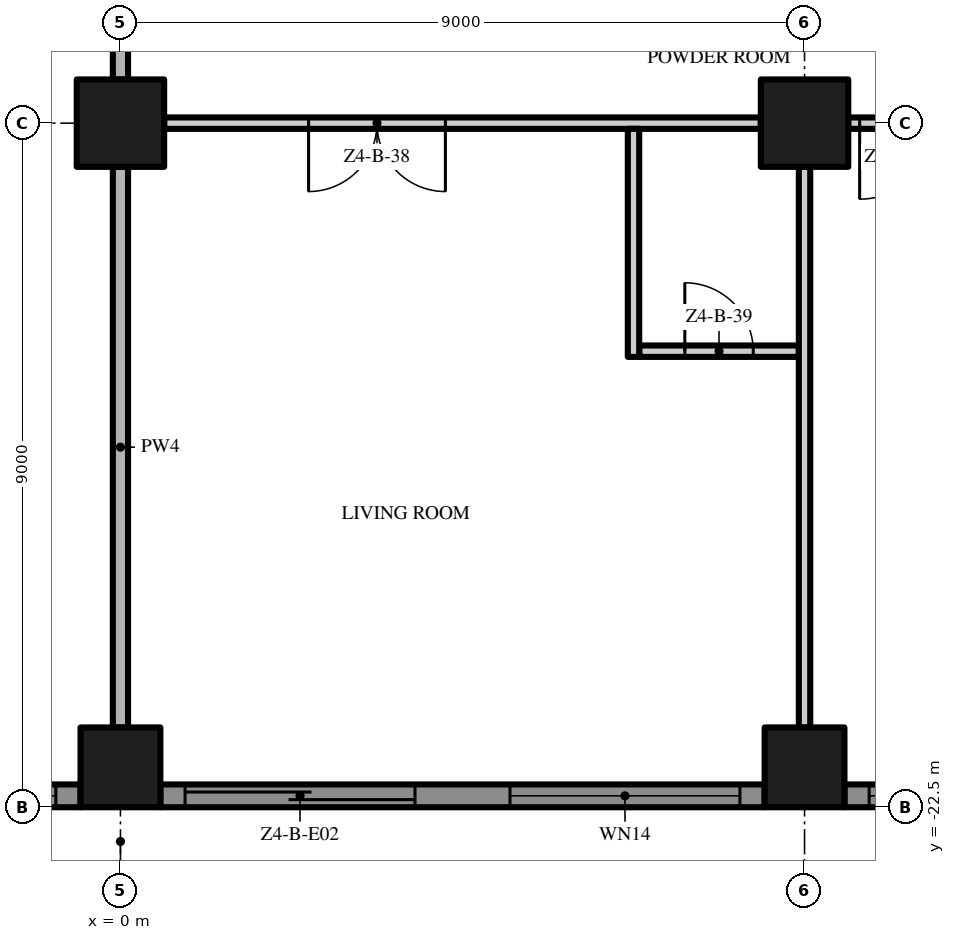
"""IFC4 building model, lengths in metres.
Left out: names, types, materials, properties, quantities, classifications, styles, units other than length and angle.
Written with IfcOpenShell. Run it as: python <this file> out.ifc"""

import sys

from ifc_helpers import new_model, si_unit, direction, frame, frame_2d, origin, origin_2d, place, context, subcontext, project, spatial, polyline, rectangle, outline, extrude, element, fill, save


model = new_model("IFC4")
c1 = context("Model", 3, precision=1e-05, world=origin(), true_north=direction((0.0, 1.0)))
c2 = subcontext(c1, "Body", "Model", "MODEL_VIEW")
j1 = project(units=[si_unit("LENGTHUNIT", "METRE"), si_unit("PLANEANGLEUNIT", "RADIAN")], contexts=[c1])
p1 = place(None, origin())
s1 = spatial("IfcSite", under=j1, at=p1, CompositionType="ELEMENT")
p2 = place(p1, origin())
s2 = spatial("IfcBuilding", under=s1, at=p2, CompositionType="ELEMENT")
p3 = place(p2, frame((0.0, 0.0, 195.8)))
s3 = spatial("IfcBuildingStorey", under=s2, at=p3, CompositionType="ELEMENT", Elevation=195.8)
p4 = place(p3, frame((0.0, -13.5, 0.0), z_axis=(0.0, 0.0, 1.0), x_axis=(1.0, 0.0, 0.0)))
e1 = element("IfcColumn", 1, at=p4, inside=s3, PredefinedType="COLUMN", context=c2, shape_type="SweptSolid", body=[
    extrude(rectangle(XDim=1.15, YDim=1.15, at=origin_2d()), origin(), (0.0, 0.0, 1.0), 3.5),
])
p5 = place(p3, frame((0.0, -21.975, 0.0), z_axis=(0.0, 0.0, 1.0), x_axis=(1.0, 0.0, 0.0)))
e2 = element("IfcColumn", 2, at=p5, inside=s3, PredefinedType="COLUMN", context=c2, shape_type="SweptSolid", body=[
    extrude(rectangle(XDim=1.05, YDim=1.05, at=origin_2d()), origin(), (0.0, 0.0, 1.0), 3.5),
])
p6 = place(p3, frame((9.0, -13.5, 0.0), z_axis=(0.0, 0.0, 1.0), x_axis=(1.0, 0.0, 0.0)))
e3 = element("IfcColumn", 3, at=p6, inside=s3, PredefinedType="COLUMN", context=c2, shape_type="SweptSolid", body=[
    extrude(rectangle(XDim=1.15, YDim=1.15, at=origin_2d()), origin(), (0.0, 0.0, 1.0), 3.5),
])
p7 = place(p3, frame((9.0, -21.975, 0.0), z_axis=(0.0, 0.0, 1.0), x_axis=(1.0, 0.0, 0.0)))
e4 = element("IfcColumn", 4, at=p7, inside=s3, PredefinedType="COLUMN", context=c2, shape_type="SweptSolid", body=[
    extrude(rectangle(XDim=1.05, YDim=1.05, at=origin_2d()), origin(), (0.0, 0.0, 1.0), 3.5),
])
p8 = place(p3, frame((-0.525, -22.35, 0.0), z_axis=(0.0, 0.0, 1.0), x_axis=(-1.0, 0.0, 0.0)))
e5 = element("IfcWall", 5, at=p8, inside=s3, PredefinedType="SOLIDWALL", context=c2, shape_type="SweptSolid", body=[
    extrude(rectangle(XDim=7.95, YDim=0.3, at=frame_2d((3.975, 0.0))), origin(), (0.0, 0.0, 1.0), 3.5),
])
p9 = place(p8, frame((4.6, 0.0, 0.45)))
e6 = element("IfcOpeningElement", 6, at=p9, cuts=e5, PredefinedType="OPENING", context=c2, shape_type="SweptSolid", body=[
    extrude(rectangle(XDim=3.025, YDim=2.65, at=frame_2d((1.512, 1.325))), frame((0.0, 0.16, 0.0), z_axis=(0.0, -1.0, 0.0), x_axis=(1.0, 0.0, 0.0)), (0.0, 0.0, 1.0), 0.32),
])
p10 = place(p8, frame((0.325, 0.0, 0.45)))
e7 = element("IfcOpeningElement", 7, at=p10, cuts=e5, PredefinedType="OPENING", context=c2, shape_type="SweptSolid", body=[
    extrude(rectangle(XDim=3.025, YDim=2.65, at=frame_2d((1.512, 1.325))), frame((0.0, 0.16, 0.0), z_axis=(0.0, -1.0, 0.0), x_axis=(1.0, 0.0, 0.0)), (0.0, 0.0, 1.0), 0.32),
])
p11 = place(p3, frame((8.475, -22.35, 0.0), z_axis=(0.0, 0.0, 1.0), x_axis=(-1.0, 0.0, 0.0)))
e8 = element("IfcWall", 8, at=p11, inside=s3, PredefinedType="SOLIDWALL", context=c2, shape_type="SweptSolid", body=[
    extrude(rectangle(XDim=7.95, YDim=0.3, at=frame_2d((3.975, 0.0))), origin(), (0.0, 0.0, 1.0), 3.5),
])
p12 = place(p11, frame((4.6, 0.0, 0.0)))
e9 = element("IfcOpeningElement", 9, at=p12, cuts=e8, PredefinedType="OPENING", context=c2, shape_type="SweptSolid", body=[
    extrude(rectangle(XDim=3.025, YDim=2.4, at=frame_2d((1.512, 1.2))), frame((0.0, 0.16, 0.0), z_axis=(0.0, -1.0, 0.0), x_axis=(1.0, 0.0, 0.0)), (0.0, 0.0, 1.0), 0.32),
])
p13 = place(p11, frame((0.325, 0.0, 0.45)))
e10 = element("IfcOpeningElement", 10, at=p13, cuts=e8, PredefinedType="OPENING", context=c2, shape_type="SweptSolid", body=[
    extrude(rectangle(XDim=3.025, YDim=2.65, at=frame_2d((1.512, 1.325))), frame((0.0, 0.16, 0.0), z_axis=(0.0, -1.0, 0.0), x_axis=(1.0, 0.0, 0.0)), (0.0, 0.0, 1.0), 0.32),
])
p14 = place(p3, frame((17.475, -22.35, 0.0), z_axis=(0.0, 0.0, 1.0), x_axis=(-1.0, 0.0, 0.0)))
e11 = element("IfcWall", 11, at=p14, inside=s3, PredefinedType="SOLIDWALL", context=c2, shape_type="SweptSolid", body=[
    extrude(rectangle(XDim=7.95, YDim=0.3, at=frame_2d((3.975, 0.0))), origin(), (0.0, 0.0, 1.0), 3.5),
])
p15 = place(p14, frame((4.6, 0.0, 0.45)))
e12 = element("IfcOpeningElement", 12, at=p15, cuts=e11, PredefinedType="OPENING", context=c2, shape_type="SweptSolid", body=[
    extrude(rectangle(XDim=3.025, YDim=2.65, at=frame_2d((1.512, 1.325))), frame((0.0, 0.16, 0.0), z_axis=(0.0, -1.0, 0.0), x_axis=(1.0, 0.0, 0.0)), (0.0, 0.0, 1.0), 0.32),
])
p16 = place(p14, frame((0.325, 0.0, 0.45)))
e13 = element("IfcOpeningElement", 13, at=p16, cuts=e11, PredefinedType="OPENING", context=c2, shape_type="SweptSolid", body=[
    extrude(rectangle(XDim=3.025, YDim=2.65, at=frame_2d((1.512, 1.325))), frame((0.0, 0.16, 0.0), z_axis=(0.0, -1.0, 0.0), x_axis=(1.0, 0.0, 0.0)), (0.0, 0.0, 1.0), 0.32),
])
p17 = place(p3, origin())
e14 = element("IfcWall", 14, at=p17, inside=s3, PredefinedType="USERDEFINED", context=c2, shape_type="SweptSolid", body=[
    extrude(outline(polyline([(-22.5, -24.3), (-21.0, -23.595), (-19.5, -23.159), (-18.75, -23.1), (-18.0, -23.159), (-16.5, -23.595), (-15.0, -24.3), (-13.5, -25.005), (-12.0, -25.441), (-11.25, -25.5), (-10.5, -25.441), (-9.0, -25.005), (-7.5, -24.3), (-6.0, -23.595), (-4.5, -23.159), (-3.75, -23.1), (-3.0, -23.159), (-1.5, -23.595), (0.0, -24.3), (1.5, -25.005), (3.0, -25.441), (3.75, -25.5), (4.5, -25.441), (6.0, -25.005), (7.5, -24.3), (9.0, -23.595), (10.5, -23.159), (11.25, -23.1), (12.0, -23.159), (13.5, -23.595), (15.0, -24.3), (16.5, -25.005), (18.0, -25.441), (18.75, -25.5), (19.5, -25.441), (21.0, -25.005), (22.5, -24.3), (22.394, -24.074), (20.911, -24.771), (19.455, -25.194), (18.75, -25.249), (18.045, -25.194), (16.589, -24.771), (15.106, -24.074), (13.589, -23.36), (12.045, -22.911), (11.25, -22.849), (10.455, -22.911), (8.911, -23.36), (7.394, -24.074), (5.911, -24.771), (4.455, -25.194), (3.75, -25.249), (3.045, -25.194), (1.589, -24.771), (0.106, -24.074), (-1.411, -23.36), (-2.955, -22.911), (-3.75, -22.849), (-4.545, -22.911), (-6.089, -23.36), (-7.606, -24.074), (-9.089, -24.771), (-10.545, -25.194), (-11.25, -25.249), (-11.955, -25.194), (-13.411, -24.771), (-14.894, -24.074), (-16.411, -23.36), (-17.955, -22.911), (-18.75, -22.849), (-19.545, -22.911), (-21.089, -23.36), (-22.606, -24.074), (-22.5, -24.3)])), origin(), (0.0, 0.0, 1.0), 0.9),
])
p18 = place(p3, frame((6.825, -16.5, 0.0), z_axis=(0.0, 0.0, 1.0), x_axis=(1.0, 0.0, 0.0)))
e15 = element("IfcWall", 15, at=p18, inside=s3, PredefinedType="PARTITIONING", context=c2, shape_type="SweptSolid", body=[
    extrude(rectangle(XDim=2.1, YDim=0.15, at=frame_2d((1.05, 0.0))), origin(), (0.0, 0.0, 1.0), 3.5),
])
p19 = place(p18, frame((0.6, 0.0, 0.0)))
e16 = element("IfcOpeningElement", 16, at=p19, cuts=e15, PredefinedType="OPENING", context=c2, shape_type="SweptSolid", body=[
    extrude(rectangle(XDim=0.9, YDim=2.1, at=frame_2d((0.45, 1.05))), frame((0.0, 0.085, 0.0), z_axis=(0.0, -1.0, 0.0), x_axis=(1.0, 0.0, 0.0)), (0.0, 0.0, 1.0), 0.17),
])
p20 = place(p3, frame((8.425, -13.5, 0.0), z_axis=(0.0, 0.0, 1.0), x_axis=(-1.0, 0.0, 0.0)))
e17 = element("IfcWall", 17, at=p20, inside=s3, PredefinedType="PARTITIONING", context=c2, shape_type="SweptSolid", body=[
    extrude(rectangle(XDim=7.85, YDim=0.15, at=frame_2d((3.925, 0.0))), origin(), (0.0, 0.0, 1.0), 3.5),
])
p21 = place(p20, frame((4.15, 0.0, 0.0)))
e18 = element("IfcOpeningElement", 18, at=p21, cuts=e17, PredefinedType="OPENING", context=c2, shape_type="SweptSolid", body=[
    extrude(rectangle(XDim=1.8, YDim=2.4, at=frame_2d((0.9, 1.2))), frame((0.0, 0.085, 0.0), z_axis=(0.0, -1.0, 0.0), x_axis=(1.0, 0.0, 0.0)), (0.0, 0.0, 1.0), 0.17),
])
p22 = place(p3, frame((17.425, -13.5, 0.0), z_axis=(0.0, 0.0, 1.0), x_axis=(-1.0, 0.0, 0.0)))
e19 = element("IfcWall", 19, at=p22, inside=s3, PredefinedType="PARTITIONING", context=c2, shape_type="SweptSolid", body=[
    extrude(rectangle(XDim=7.85, YDim=0.15, at=frame_2d((3.925, 0.0))), origin(), (0.0, 0.0, 1.0), 3.5),
])
p23 = place(p22, frame((6.7, 0.0, 0.0)))
e20 = element("IfcOpeningElement", 20, at=p23, cuts=e19, PredefinedType="OPENING", context=c2, shape_type="SweptSolid", body=[
    extrude(rectangle(XDim=1.0, YDim=2.4, at=frame_2d((0.5, 1.2))), frame((0.0, 0.085, 0.0), z_axis=(0.0, -1.0, 0.0), x_axis=(1.0, 0.0, 0.0)), (0.0, 0.0, 1.0), 0.17),
])
p24 = place(p22, frame((0.15, 0.0, 0.0)))
e21 = element("IfcOpeningElement", 21, at=p24, cuts=e19, PredefinedType="OPENING", context=c2, shape_type="SweptSolid", body=[
    extrude(rectangle(XDim=1.0, YDim=2.4, at=frame_2d((0.5, 1.2))), frame((0.0, 0.085, 0.0), z_axis=(0.0, -1.0, 0.0), x_axis=(1.0, 0.0, 0.0)), (0.0, 0.0, 1.0), 0.17),
])
p25 = place(p3, frame((0.0, -21.45, 0.0), z_axis=(0.0, 0.0, 1.0), x_axis=(0.0, 1.0, 0.0)))
e22 = element("IfcWall", 22, at=p25, inside=s3, PredefinedType="PARTITIONING", context=c2, shape_type="SweptSolid", body=[
    extrude(rectangle(XDim=7.375, YDim=0.2, at=frame_2d((3.688, 0.0))), origin(), (0.0, 0.0, 1.0), 3.5),
])
p26 = place(p3, frame((0.0, -12.925, 0.0), z_axis=(0.0, 0.0, 1.0), x_axis=(0.0, 1.0, 0.0)))
e23 = element("IfcWall", 23, at=p26, inside=s3, PredefinedType="PARTITIONING", context=c2, shape_type="SweptSolid", body=[
    extrude(rectangle(XDim=7.85, YDim=0.2, at=frame_2d((3.925, 0.0))), origin(), (0.0, 0.0, 1.0), 3.5),
])
p27 = place(p3, frame((6.75, -16.575, 0.0), z_axis=(0.0, 0.0, 1.0), x_axis=(0.0, 1.0, 0.0)))
e24 = element("IfcWall", 24, at=p27, inside=s3, PredefinedType="PARTITIONING", context=c2, shape_type="SweptSolid", body=[
    extrude(rectangle(XDim=3.0, YDim=0.15, at=frame_2d((1.5, 0.0))), origin(), (0.0, 0.0, 1.0), 3.5),
])
p28 = place(p3, frame((9.0, -21.45, 0.0), z_axis=(0.0, 0.0, 1.0), x_axis=(0.0, 1.0, 0.0)))
e25 = element("IfcWall", 25, at=p28, inside=s3, PredefinedType="PARTITIONING", context=c2, shape_type="SweptSolid", body=[
    extrude(rectangle(XDim=7.375, YDim=0.15, at=frame_2d((3.688, 0.0))), origin(), (0.0, 0.0, 1.0), 3.5),
])
p29 = place(p10, origin())
e26 = element("IfcWindow", 26, at=p29, inside=s3, PartitioningType="SINGLE_PANEL", PredefinedType="WINDOW", context=c2, shape_type="SweptSolid", body=[
    extrude(rectangle(XDim=3.025, YDim=2.65, at=frame_2d((1.512, 1.325))), frame((0.0, 0.03, 0.0), z_axis=(0.0, -1.0, 0.0), x_axis=(1.0, 0.0, 0.0)), (0.0, 0.0, 1.0), 0.06),
])
fill(e7, e26)
p30 = place(p12, origin())
e27 = element("IfcDoor", 27, at=p30, inside=s3, OperationType="SINGLE_SWING_LEFT", PredefinedType="DOOR", context=c2, shape_type="SweptSolid", body=[
    extrude(rectangle(XDim=3.025, YDim=2.4, at=frame_2d((1.512, 1.2))), frame((0.0, 0.025, 0.0), z_axis=(0.0, -1.0, 0.0), x_axis=(1.0, 0.0, 0.0)), (0.0, 0.0, 1.0), 0.05),
])
fill(e9, e27)
p31 = place(p13, origin())
e28 = element("IfcWindow", 28, at=p31, inside=s3, PartitioningType="SINGLE_PANEL", PredefinedType="WINDOW", context=c2, shape_type="SweptSolid", body=[
    extrude(rectangle(XDim=3.025, YDim=2.65, at=frame_2d((1.512, 1.325))), frame((0.0, 0.03, 0.0), z_axis=(0.0, -1.0, 0.0), x_axis=(1.0, 0.0, 0.0)), (0.0, 0.0, 1.0), 0.06),
])
fill(e10, e28)
p32 = place(p15, origin())
e29 = element("IfcWindow", 29, at=p32, inside=s3, PartitioningType="SINGLE_PANEL", PredefinedType="WINDOW", context=c2, shape_type="SweptSolid", body=[
    extrude(rectangle(XDim=3.025, YDim=2.65, at=frame_2d((1.512, 1.325))), frame((0.0, 0.03, 0.0), z_axis=(0.0, -1.0, 0.0), x_axis=(1.0, 0.0, 0.0)), (0.0, 0.0, 1.0), 0.06),
])
fill(e12, e29)
p33 = place(p21, origin())
e30 = element("IfcDoor", 30, at=p33, inside=s3, OperationType="DOUBLE_DOOR_SINGLE_SWING", PredefinedType="DOOR", context=c2, shape_type="SweptSolid", body=[
    extrude(rectangle(XDim=1.8, YDim=2.4, at=frame_2d((0.9, 1.2))), frame((0.0, 0.025, 0.0), z_axis=(0.0, -1.0, 0.0), x_axis=(1.0, 0.0, 0.0)), (0.0, 0.0, 1.0), 0.05),
])
fill(e18, e30)
p34 = place(p19, origin())
e31 = element("IfcDoor", 31, at=p34, inside=s3, OperationType="SINGLE_SWING_LEFT", PredefinedType="DOOR", context=c2, shape_type="SweptSolid", body=[
    extrude(rectangle(XDim=0.9, YDim=2.1, at=frame_2d((0.45, 1.05))), frame((0.0, 0.025, 0.0), z_axis=(0.0, -1.0, 0.0), x_axis=(1.0, 0.0, 0.0)), (0.0, 0.0, 1.0), 0.05),
])
fill(e16, e31)
p35 = place(p23, origin())
e32 = element("IfcDoor", 32, at=p35, inside=s3, OperationType="SINGLE_SWING_RIGHT", PredefinedType="DOOR", context=c2, shape_type="SweptSolid", body=[
    extrude(rectangle(XDim=1.0, YDim=2.4, at=frame_2d((0.5, 1.2))), frame((0.0, 0.025, 0.0), z_axis=(0.0, -1.0, 0.0), x_axis=(1.0, 0.0, 0.0)), (0.0, 0.0, 1.0), 0.05),
])
fill(e20, e32)
save(model, sys.argv[1])
